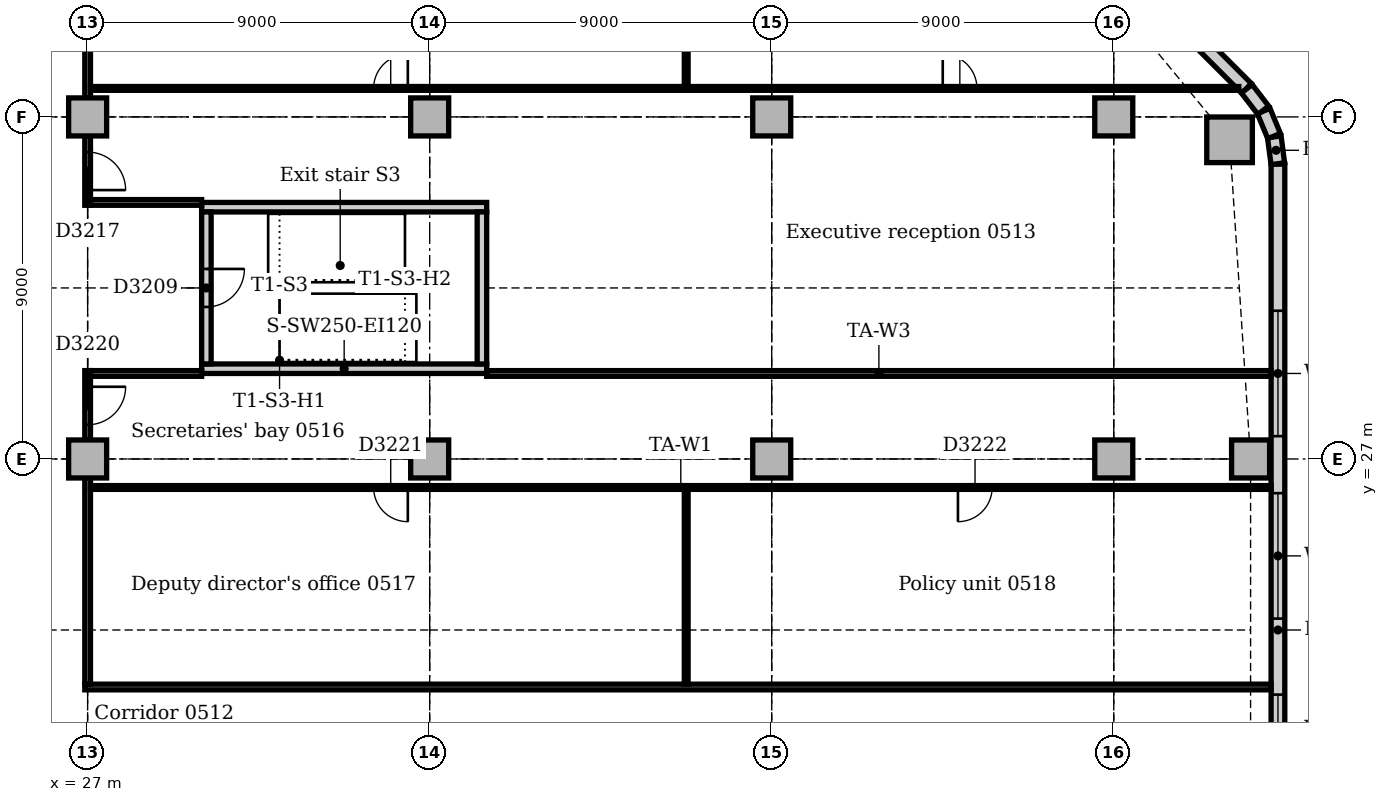
"""IFC4 building model, lengths in metres.
Left out: names, types, materials, properties, quantities, classifications, styles, units other than length and angle.
Written with IfcOpenShell. Run it as: python <this file> out.ifc"""

import sys

from ifc_helpers import new_model, si_unit, direction, frame, frame_2d, origin, origin_2d, place, context, subcontext, project, spatial, rectangle, extrude, element, fill, save


model = new_model("IFC4")
c1 = context("Model", 3, precision=1e-05, world=origin(), true_north=direction((0.0, 1.0)))
c2 = subcontext(c1, "Body", "Model", "MODEL_VIEW")
j1 = project(units=[si_unit("LENGTHUNIT", "METRE"), si_unit("PLANEANGLEUNIT", "RADIAN")], contexts=[c1])
p1 = place(None, origin())
s1 = spatial("IfcSite", under=j1, at=p1, CompositionType="ELEMENT")
p2 = place(p1, origin())
s2 = spatial("IfcBuilding", under=s1, at=p2, CompositionType="ELEMENT")
p3 = place(p2, frame((0.0, 0.0, 26.0)))
s3 = spatial("IfcBuildingStorey", under=s2, at=p3, CompositionType="ELEMENT", Elevation=26.0)
for number, where, z_axis, x_axis in (
    (1, (30.0, 29.375, 0.0), (0.0, 0.0, 1.0), (1.0, 0.0, 0.0)),
    (2, (37.5, 33.625, 0.0), (0.0, 0.0, 1.0), (-1.0, 0.0, 0.0)),
):
    element("IfcWall", number, at=place(p3, frame(where, z_axis=z_axis, x_axis=x_axis)), inside=s3, PredefinedType="SOLIDWALL", context=c2, shape_type="SweptSolid", body=[
        extrude(rectangle(XDim=7.5, YDim=0.25, at=frame_2d((3.75, 0.0))), origin(), (0.0, 0.0, 1.0), 4.0),
    ])
p4 = place(p3, frame((37.375, 29.5, 0.0), z_axis=(0.0, 0.0, 1.0), x_axis=(0.0, 1.0, 0.0)))
e3 = element("IfcWall", 3, at=p4, inside=s3, PredefinedType="SOLIDWALL", context=c2, shape_type="SweptSolid", body=[
    extrude(rectangle(XDim=4.0, YDim=0.25, at=frame_2d((2.0, 0.0))), origin(), (0.0, 0.0, 1.0), 4.0),
])
p5 = place(p3, frame((30.125, 33.5, 0.0), z_axis=(0.0, 0.0, 1.0), x_axis=(0.0, -1.0, 0.0)))
e4 = element("IfcWall", 4, at=p5, inside=s3, PredefinedType="SOLIDWALL", context=c2, shape_type="SweptSolid", body=[
    extrude(rectangle(XDim=4.0, YDim=0.25, at=frame_2d((2.0, 0.0))), origin(), (0.0, 0.0, 1.0), 4.0),
])
p6 = place(p5, frame((1.5, 0.0, 0.0)))
e5 = element("IfcOpeningElement", 5, at=p6, cuts=e4, PredefinedType="OPENING", context=c2, shape_type="SweptSolid", body=[
    extrude(rectangle(XDim=1.0, YDim=2.1, at=frame_2d((0.5, 1.05))), frame((0.0, 0.135, 0.0), z_axis=(0.0, -1.0, 0.0), x_axis=(1.0, 0.0, 0.0)), (0.0, 0.0, 1.0), 0.27),
])
p7 = place(p3, frame((57.047, 35.398, 0.0), z_axis=(0.0, 0.0, 1.0), x_axis=(1.0, 0.0, 0.0)))
e6 = element("IfcColumn", 6, at=p7, inside=s3, PredefinedType="COLUMN", context=c2, shape_type="SweptSolid", body=[
    extrude(rectangle(XDim=1.2, YDim=1.2, at=origin_2d()), origin(), (0.0, 0.0, 1.0), 3.85),
])
for number, where, z_axis, x_axis in (
    (7, (57.6, 27.0, 0.0), (0.0, 0.0, 1.0), (1.0, 0.0, 0.0)),
    (8, (27.0, 27.0, 0.0), (0.0, 0.0, 1.0), (1.0, 0.0, 0.0)),
    (9, (27.0, 36.0, 0.0), (0.0, 0.0, 1.0), (1.0, 0.0, 0.0)),
    (10, (36.0, 27.0, 0.0), (0.0, 0.0, 1.0), (1.0, 0.0, 0.0)),
    (11, (36.0, 36.0, 0.0), (0.0, 0.0, 1.0), (1.0, 0.0, 0.0)),
    (12, (45.0, 27.0, 0.0), (0.0, 0.0, 1.0), (1.0, 0.0, 0.0)),
    (13, (45.0, 36.0, 0.0), (0.0, 0.0, 1.0), (1.0, 0.0, 0.0)),
    (14, (54.0, 27.0, 0.0), (0.0, 0.0, 1.0), (1.0, 0.0, 0.0)),
    (15, (54.0, 36.0, 0.0), (0.0, 0.0, 1.0), (1.0, 0.0, 0.0)),
):
    element("IfcColumn", number, at=place(p3, frame(where, z_axis=z_axis, x_axis=x_axis)), inside=s3, PredefinedType="COLUMN", context=c2, shape_type="SweptSolid", body=[
        extrude(rectangle(XDim=1.0, YDim=1.0, at=origin_2d()), origin(), (0.0, 0.0, 1.0), 3.85),
    ])
p8 = place(p3, frame((58.32, 10.243, 0.0), z_axis=(0.0, 0.0, 1.0), x_axis=(0.0, 1.0, 0.0)))
e16 = element("IfcWall", 16, at=p8, inside=s3, PredefinedType="STANDARD", context=c2, shape_type="SweptSolid", body=[
    extrude(rectangle(XDim=24.515, YDim=0.36, at=frame_2d((12.257, 0.0))), origin(), (0.0, 0.0, 1.0), 3.85),
])
p9 = place(p8, frame((4.607, 0.0, 0.0)))
e17 = element("IfcOpeningElement", 17, at=p9, cuts=e16, PredefinedType="OPENING", context=c2, shape_type="SweptSolid", body=[
    extrude(rectangle(XDim=1.8, YDim=2.4, at=frame_2d((0.9, 1.2))), frame((0.0, 0.19, 0.0), z_axis=(0.0, -1.0, 0.0), x_axis=(1.0, 0.0, 0.0)), (0.0, 0.0, 1.0), 0.38),
])
p10 = place(p8, frame((8.757, 0.0, 0.9)))
e18 = element("IfcOpeningElement", 18, at=p10, cuts=e16, PredefinedType="OPENING", context=c2, shape_type="SweptSolid", body=[
    extrude(rectangle(XDim=1.8, YDim=1.6, at=frame_2d((0.9, 0.8))), frame((0.0, 0.19, 0.0), z_axis=(0.0, -1.0, 0.0), x_axis=(1.0, 0.0, 0.0)), (0.0, 0.0, 1.0), 0.38),
])
p11 = place(p8, frame((12.557, 0.0, 0.9)))
e19 = element("IfcOpeningElement", 19, at=p11, cuts=e16, PredefinedType="OPENING", context=c2, shape_type="SweptSolid", body=[
    extrude(rectangle(XDim=3.3, YDim=1.6, at=frame_2d((1.65, 0.8))), frame((0.0, 0.19, 0.0), z_axis=(0.0, -1.0, 0.0), x_axis=(1.0, 0.0, 0.0)), (0.0, 0.0, 1.0), 0.38),
])
p12 = place(p8, frame((17.357, 0.0, 0.9)))
e20 = element("IfcOpeningElement", 20, at=p12, cuts=e16, PredefinedType="OPENING", context=c2, shape_type="SweptSolid", body=[
    extrude(rectangle(XDim=3.3, YDim=1.6, at=frame_2d((1.65, 0.8))), frame((0.0, 0.19, 0.0), z_axis=(0.0, -1.0, 0.0), x_axis=(1.0, 0.0, 0.0)), (0.0, 0.0, 1.0), 0.38),
])
p13 = place(p3, frame((57.494, 36.751, 0.0), z_axis=(0.0, 0.0, 1.0), x_axis=(-0.707106781187, 0.707106781187, 0.0)))
e21 = element("IfcWall", 21, at=p13, inside=s3, PredefinedType="STANDARD", context=c2, shape_type="SweptSolid", body=[
    extrude(rectangle(XDim=10.243, YDim=0.36, at=frame_2d((5.121, 0.0))), origin(), (0.0, 0.0, 1.0), 3.85),
])
p14 = place(p13, frame((3.471, 0.0, 0.9)))
e22 = element("IfcOpeningElement", 22, at=p14, cuts=e21, PredefinedType="OPENING", context=c2, shape_type="SweptSolid", body=[
    extrude(rectangle(XDim=3.3, YDim=1.6, at=frame_2d((1.65, 0.8))), frame((0.0, 0.19, 0.0), z_axis=(0.0, -1.0, 0.0), x_axis=(1.0, 0.0, 0.0)), (0.0, 0.0, 1.0), 0.38),
])
for number, where, z_axis, x_axis in (
    (23, (58.317, 34.769, 0.0), (0.0, 0.0, 1.0), (-0.131, 0.991, 0.0)),
    (24, (58.218, 35.497, 0.0), (0.0, 0.0, 1.0), (-0.383, 0.924, 0.0)),
):
    element("IfcWall", number, at=place(p3, frame(where, z_axis=z_axis, x_axis=x_axis)), inside=s3, PredefinedType="STANDARD", context=c2, shape_type="SweptSolid", body=[
        extrude(rectangle(XDim=0.713, YDim=0.36, at=frame_2d((0.356, 0.0))), origin(), (0.0, 0.0, 1.0), 3.85),
    ])
p15 = place(p3, frame((57.934, 36.175, 0.0), z_axis=(0.0, 0.0, 1.0), x_axis=(-0.608802368033, 0.793321924995, 0.0)))
e25 = element("IfcWall", 25, at=p15, inside=s3, PredefinedType="STANDARD", context=c2, shape_type="SweptSolid", body=[
    extrude(rectangle(XDim=0.713, YDim=0.36, at=frame_2d((0.357, 0.0))), origin(), (0.0, 0.0, 1.0), 3.85),
])
p16 = place(p3, frame((26.925, 21.0, 0.0), z_axis=(0.0, 0.0, 1.0), x_axis=(1.0, 0.0, 0.0)))
e26 = element("IfcWall", 26, at=p16, inside=s3, PredefinedType="PARTITIONING", context=c2, shape_type="SweptSolid", body=[
    extrude(rectangle(XDim=31.215, YDim=0.15, at=frame_2d((15.607, 0.0))), origin(), (0.0, 0.0, 1.0), 3.85),
])
p17 = place(p3, frame((27.0, 33.675, 0.0), z_axis=(0.0, 0.0, 1.0), x_axis=(0.0, 1.0, 0.0)))
e27 = element("IfcWall", 27, at=p17, inside=s3, PredefinedType="PARTITIONING", context=c2, shape_type="SweptSolid", body=[
    extrude(rectangle(XDim=1.825, YDim=0.15, at=frame_2d((0.912, 0.0))), origin(), (0.0, 0.0, 1.0), 3.158),
])
p18 = place(p17, frame((0.4, 0.0, 0.0)))
e28 = element("IfcOpeningElement", 28, at=p18, cuts=e27, PredefinedType="OPENING", context=c2, shape_type="SweptSolid", body=[
    extrude(rectangle(XDim=1.0, YDim=2.1, at=frame_2d((0.5, 1.05))), frame((0.0, 0.085, 0.0), z_axis=(0.0, -1.0, 0.0), x_axis=(1.0, 0.0, 0.0)), (0.0, 0.0, 1.0), 0.17),
])
p19 = place(p3, frame((27.0, 36.5, 0.0), z_axis=(0.0, 0.0, 1.0), x_axis=(0.0, 1.0, 0.0)))
e29 = element("IfcWall", 29, at=p19, inside=s3, PredefinedType="PARTITIONING", context=c2, shape_type="SweptSolid", body=[
    extrude(rectangle(XDim=7.1, YDim=0.15, at=frame_2d((3.55, 0.0))), origin(), (0.0, 0.0, 1.0), 3.158),
])
p20 = place(p3, frame((27.0, 21.075, 0.0), z_axis=(0.0, 0.0, 1.0), x_axis=(0.0, 1.0, 0.0)))
e30 = element("IfcWall", 30, at=p20, inside=s3, PredefinedType="PARTITIONING", context=c2, shape_type="SweptSolid", body=[
    extrude(rectangle(XDim=5.425, YDim=0.15, at=frame_2d((2.712, 0.0))), origin(), (0.0, 0.0, 1.0), 3.158),
])
p21 = place(p3, frame((27.0, 27.5, 0.0), z_axis=(0.0, 0.0, 1.0), x_axis=(0.0, 1.0, 0.0)))
e31 = element("IfcWall", 31, at=p21, inside=s3, PredefinedType="PARTITIONING", context=c2, shape_type="SweptSolid", body=[
    extrude(rectangle(XDim=1.825, YDim=0.15, at=frame_2d((0.912, 0.0))), origin(), (0.0, 0.0, 1.0), 3.158),
])
p22 = place(p21, frame((0.4, 0.0, 0.0)))
e32 = element("IfcOpeningElement", 32, at=p22, cuts=e31, PredefinedType="OPENING", context=c2, shape_type="SweptSolid", body=[
    extrude(rectangle(XDim=1.0, YDim=2.1, at=frame_2d((0.5, 1.05))), frame((0.0, 0.085, 0.0), z_axis=(0.0, -1.0, 0.0), x_axis=(1.0, 0.0, 0.0)), (0.0, 0.0, 1.0), 0.17),
])
for number, where, z_axis, x_axis in (
    (33, (27.075, 29.25, 0.0), (0.0, 0.0, 1.0), (1.0, 0.0, 0.0)),
    (34, (27.075, 33.75, 0.0), (0.0, 0.0, 1.0), (1.0, 0.0, 0.0)),
):
    element("IfcWall", number, at=place(p3, frame(where, z_axis=z_axis, x_axis=x_axis)), inside=s3, PredefinedType="PARTITIONING", context=c2, shape_type="SweptSolid", body=[
        extrude(rectangle(XDim=2.925, YDim=0.15, at=frame_2d((1.462, 0.0))), origin(), (0.0, 0.0, 1.0), 3.85),
    ])
p23 = place(p3, frame((37.5, 29.25, 0.0), z_axis=(0.0, 0.0, 1.0), x_axis=(1.0, 0.0, 0.0)))
e35 = element("IfcWall", 35, at=p23, inside=s3, PredefinedType="PARTITIONING", context=c2, shape_type="SweptSolid", body=[
    extrude(rectangle(XDim=20.64, YDim=0.15, at=frame_2d((10.32, 0.0))), origin(), (0.0, 0.0, 1.0), 3.85),
])
p24 = place(p3, frame((27.075, 26.25, 0.0), z_axis=(0.0, 0.0, 1.0), x_axis=(1.0, 0.0, 0.0)))
e36 = element("IfcWall", 36, at=p24, inside=s3, PredefinedType="PARTITIONING", context=c2, shape_type="SweptSolid", body=[
    extrude(rectangle(XDim=31.065, YDim=0.1, at=frame_2d((15.533, 0.0))), origin(), (0.0, 0.0, 1.0), 3.85),
])
p25 = place(p24, frame((7.45, 0.0, 0.0)))
e37 = element("IfcOpeningElement", 37, at=p25, cuts=e36, PredefinedType="OPENING", context=c2, shape_type="SweptSolid", body=[
    extrude(rectangle(XDim=0.9, YDim=2.1, at=frame_2d((0.45, 1.05))), frame((0.0, 0.06, 0.0), z_axis=(0.0, -1.0, 0.0), x_axis=(1.0, 0.0, 0.0)), (0.0, 0.0, 1.0), 0.12),
])
p26 = place(p24, frame((22.825, 0.0, 0.0)))
e38 = element("IfcOpeningElement", 38, at=p26, cuts=e36, PredefinedType="OPENING", context=c2, shape_type="SweptSolid", body=[
    extrude(rectangle(XDim=0.9, YDim=2.1, at=frame_2d((0.45, 1.05))), frame((0.0, 0.06, 0.0), z_axis=(0.0, -1.0, 0.0), x_axis=(1.0, 0.0, 0.0)), (0.0, 0.0, 1.0), 0.12),
])
p27 = place(p3, frame((27.075, 36.75, 0.0), z_axis=(0.0, 0.0, 1.0), x_axis=(1.0, 0.0, 0.0)))
e39 = element("IfcWall", 39, at=p27, inside=s3, PredefinedType="PARTITIONING", context=c2, shape_type="SweptSolid", body=[
    extrude(rectangle(XDim=30.216, YDim=0.1, at=frame_2d((15.108, 0.0))), origin(), (0.0, 0.0, 1.0), 3.85),
])
p28 = place(p27, frame((7.45, 0.0, 0.0)))
e40 = element("IfcOpeningElement", 40, at=p28, cuts=e39, PredefinedType="OPENING", context=c2, shape_type="SweptSolid", body=[
    extrude(rectangle(XDim=0.9, YDim=2.1, at=frame_2d((0.45, 1.05))), frame((0.0, 0.06, 0.0), z_axis=(0.0, -1.0, 0.0), x_axis=(1.0, 0.0, 0.0)), (0.0, 0.0, 1.0), 0.12),
])
p29 = place(p27, frame((22.425, 0.0, 0.0)))
e41 = element("IfcOpeningElement", 41, at=p29, cuts=e39, PredefinedType="OPENING", context=c2, shape_type="SweptSolid", body=[
    extrude(rectangle(XDim=0.9, YDim=2.1, at=frame_2d((0.45, 1.05))), frame((0.0, 0.06, 0.0), z_axis=(0.0, -1.0, 0.0), x_axis=(1.0, 0.0, 0.0)), (0.0, 0.0, 1.0), 0.12),
])
p30 = place(p3, frame((42.75, 36.8, 0.0), z_axis=(0.0, 0.0, 1.0), x_axis=(0.0, 1.0, 0.0)))
e42 = element("IfcWall", 42, at=p30, inside=s3, PredefinedType="PARTITIONING", context=c2, shape_type="SweptSolid", body=[
    extrude(rectangle(XDim=7.84, YDim=0.1, at=frame_2d((3.92, 0.0))), origin(), (0.0, 0.0, 1.0), 3.85),
])
p31 = place(p3, frame((42.75, 21.075, 0.0), z_axis=(0.0, 0.0, 1.0), x_axis=(0.0, 1.0, 0.0)))
e43 = element("IfcWall", 43, at=p31, inside=s3, PredefinedType="PARTITIONING", context=c2, shape_type="SweptSolid", body=[
    extrude(rectangle(XDim=5.125, YDim=0.1, at=frame_2d((2.562, 0.0))), origin(), (0.0, 0.0, 1.0), 3.85),
])
p32 = place(p10, origin())
e44 = element("IfcWindow", 44, at=p32, inside=s3, PartitioningType="SINGLE_PANEL", PredefinedType="WINDOW", context=c2, shape_type="SweptSolid", body=[
    extrude(rectangle(XDim=1.8, YDim=1.6, at=frame_2d((0.9, 0.8))), frame((0.0, 0.13, 0.0), z_axis=(0.0, -1.0, 0.0), x_axis=(1.0, 0.0, 0.0)), (0.0, 0.0, 1.0), 0.06),
])
fill(e18, e44)
p33 = place(p11, origin())
e45 = element("IfcWindow", 45, at=p33, inside=s3, PartitioningType="SINGLE_PANEL", PredefinedType="WINDOW", context=c2, shape_type="SweptSolid", body=[
    extrude(rectangle(XDim=3.3, YDim=1.6, at=frame_2d((1.65, 0.8))), frame((0.0, 0.13, 0.0), z_axis=(0.0, -1.0, 0.0), x_axis=(1.0, 0.0, 0.0)), (0.0, 0.0, 1.0), 0.06),
])
fill(e19, e45)
p34 = place(p12, origin())
e46 = element("IfcWindow", 46, at=p34, inside=s3, PartitioningType="SINGLE_PANEL", PredefinedType="WINDOW", context=c2, shape_type="SweptSolid", body=[
    extrude(rectangle(XDim=3.3, YDim=1.6, at=frame_2d((1.65, 0.8))), frame((0.0, 0.13, 0.0), z_axis=(0.0, -1.0, 0.0), x_axis=(1.0, 0.0, 0.0)), (0.0, 0.0, 1.0), 0.06),
])
fill(e20, e46)
p35 = place(p6, origin())
e47 = element("IfcDoor", 47, at=p35, inside=s3, OperationType="SINGLE_SWING_LEFT", PredefinedType="DOOR", context=c2, shape_type="SweptSolid", body=[
    extrude(rectangle(XDim=1.0, YDim=2.1, at=frame_2d((0.5, 1.05))), frame((0.0, 0.025, 0.0), z_axis=(0.0, -1.0, 0.0), x_axis=(1.0, 0.0, 0.0)), (0.0, 0.0, 1.0), 0.05),
])
fill(e5, e47)
p36 = place(p18, frame((1.0, 0.0, 0.0), z_axis=(0.0, 0.0, 1.0), x_axis=(-1.0, 0.0, 0.0)))
e48 = element("IfcDoor", 48, at=p36, inside=s3, OperationType="SINGLE_SWING_RIGHT", PredefinedType="DOOR", context=c2, shape_type="SweptSolid", body=[
    extrude(rectangle(XDim=1.0, YDim=2.1, at=frame_2d((0.5, 1.05))), frame((0.0, 0.025, 0.0), z_axis=(0.0, -1.0, 0.0), x_axis=(1.0, 0.0, 0.0)), (0.0, 0.0, 1.0), 0.05),
])
fill(e28, e48)
p37 = place(p28, origin())
e49 = element("IfcDoor", 49, at=p37, inside=s3, OperationType="SINGLE_SWING_RIGHT", PredefinedType="DOOR", context=c2, shape_type="SweptSolid", body=[
    extrude(rectangle(XDim=0.9, YDim=2.1, at=frame_2d((0.45, 1.05))), frame((0.0, 0.025, 0.0), z_axis=(0.0, -1.0, 0.0), x_axis=(1.0, 0.0, 0.0)), (0.0, 0.0, 1.0), 0.05),
])
fill(e40, e49)
p38 = place(p29, origin())
e50 = element("IfcDoor", 50, at=p38, inside=s3, OperationType="SINGLE_SWING_LEFT", PredefinedType="DOOR", context=c2, shape_type="SweptSolid", body=[
    extrude(rectangle(XDim=0.9, YDim=2.1, at=frame_2d((0.45, 1.05))), frame((0.0, 0.025, 0.0), z_axis=(0.0, -1.0, 0.0), x_axis=(1.0, 0.0, 0.0)), (0.0, 0.0, 1.0), 0.05),
])
fill(e41, e50)
p39 = place(p22, frame((1.0, 0.0, 0.0), z_axis=(0.0, 0.0, 1.0), x_axis=(-1.0, 0.0, 0.0)))
e51 = element("IfcDoor", 51, at=p39, inside=s3, OperationType="SINGLE_SWING_LEFT", PredefinedType="DOOR", context=c2, shape_type="SweptSolid", body=[
    extrude(rectangle(XDim=1.0, YDim=2.1, at=frame_2d((0.5, 1.05))), frame((0.0, 0.025, 0.0), z_axis=(0.0, -1.0, 0.0), x_axis=(1.0, 0.0, 0.0)), (0.0, 0.0, 1.0), 0.05),
])
fill(e32, e51)
p40 = place(p25, frame((0.9, 0.0, 0.0), z_axis=(0.0, 0.0, 1.0), x_axis=(-1.0, 0.0, 0.0)))
e52 = element("IfcDoor", 52, at=p40, inside=s3, OperationType="SINGLE_SWING_LEFT", PredefinedType="DOOR", context=c2, shape_type="SweptSolid", body=[
    extrude(rectangle(XDim=0.9, YDim=2.1, at=frame_2d((0.45, 1.05))), frame((0.0, 0.025, 0.0), z_axis=(0.0, -1.0, 0.0), x_axis=(1.0, 0.0, 0.0)), (0.0, 0.0, 1.0), 0.05),
])
fill(e37, e52)
p41 = place(p26, frame((0.9, 0.0, 0.0), z_axis=(0.0, 0.0, 1.0), x_axis=(-1.0, 0.0, 0.0)))
e53 = element("IfcDoor", 53, at=p41, inside=s3, OperationType="SINGLE_SWING_RIGHT", PredefinedType="DOOR", context=c2, shape_type="SweptSolid", body=[
    extrude(rectangle(XDim=0.9, YDim=2.1, at=frame_2d((0.45, 1.05))), frame((0.0, 0.025, 0.0), z_axis=(0.0, -1.0, 0.0), x_axis=(1.0, 0.0, 0.0)), (0.0, 0.0, 1.0), 0.05),
])
fill(e38, e53)
save(model, sys.argv[1])
